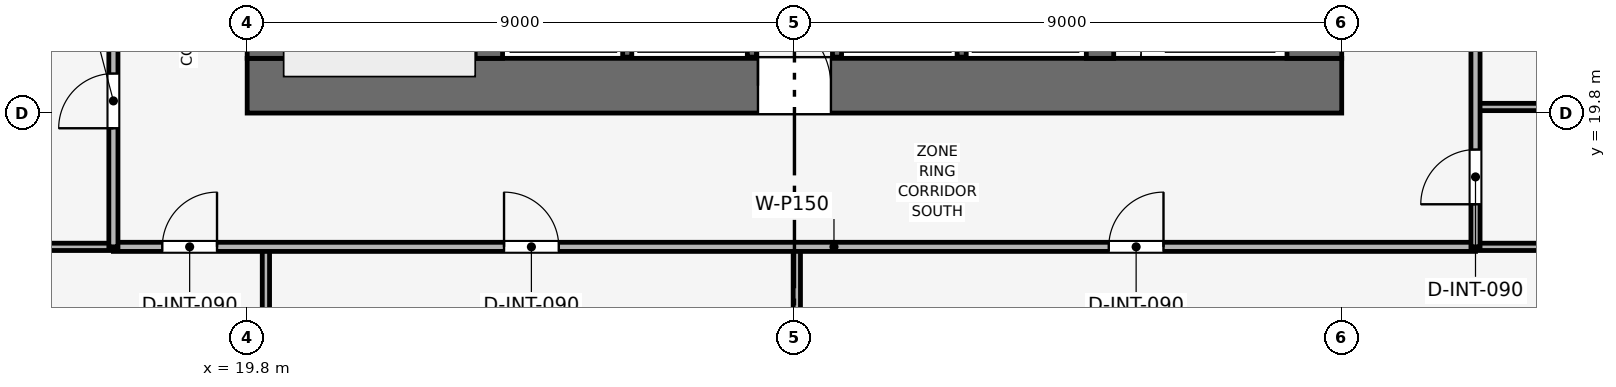
"""IFC4 building model, lengths in metres.
Left out: names, types, materials, properties, quantities, classifications, styles, units other than length and angle.
Written with IfcOpenShell. Run it as: python <this file> out.ifc"""

import sys

from ifc_helpers import new_model, si_unit, direction, frame, frame_2d, origin, place, context, subcontext, project, spatial, rectangle, extrude, element, fill, save


model = new_model("IFC4")
c1 = context("Model", 3, precision=1e-05, world=origin(), true_north=direction((0.0, 1.0)))
c2 = subcontext(c1, "Body", "Model", "MODEL_VIEW")
j1 = project(units=[si_unit("LENGTHUNIT", "METRE"), si_unit("PLANEANGLEUNIT", "RADIAN")], contexts=[c1])
p1 = place(None, origin())
s1 = spatial("IfcSite", under=j1, at=p1, CompositionType="ELEMENT")
p2 = place(p1, origin())
s2 = spatial("IfcBuilding", under=s1, at=p2, CompositionType="ELEMENT")
p3 = place(p2, frame((0.0, 0.0, 121.2)))
s3 = spatial("IfcBuildingStorey", under=s2, at=p3, CompositionType="ELEMENT", Elevation=121.2)
p4 = place(p3, frame((19.8, 20.25, 0.0), z_axis=(0.0, 0.0, 1.0), x_axis=(1.0, 0.0, 0.0)))
e1 = element("IfcWall", 1, at=p4, inside=s3, PredefinedType="SHEAR", context=c2, shape_type="SweptSolid", body=[
    extrude(rectangle(XDim=18.0, YDim=0.9, at=frame_2d((9.0, 0.0))), origin(), (0.0, 0.0, 1.0), 3.9),
])
p5 = place(p4, frame((8.4, 0.0, 0.0)))
e2 = element("IfcOpeningElement", 2, at=p5, cuts=e1, PredefinedType="OPENING", context=c2, shape_type="SweptSolid", body=[
    extrude(rectangle(XDim=1.2, YDim=2.2, at=frame_2d((0.6, 1.1))), frame((0.0, 0.46, 0.0), z_axis=(0.0, -1.0, 0.0), x_axis=(1.0, 0.0, 0.0)), (0.0, 0.0, 1.0), 0.92),
])
p6 = place(p3, frame((20.25, 20.7, 0.0), z_axis=(0.0, 0.0, 1.0), x_axis=(0.0, 1.0, 0.0)))
e3 = element("IfcWall", 3, at=p6, inside=s3, PredefinedType="SHEAR", context=c2, shape_type="SweptSolid", body=[
    extrude(rectangle(XDim=16.2, YDim=0.9, at=frame_2d((8.1, 0.0))), origin(), (0.0, 0.0, 1.0), 3.9),
])
p7 = place(p6, frame((10.1, 0.0, 0.0)))
e4 = element("IfcOpeningElement", 4, at=p7, cuts=e3, PredefinedType="OPENING", context=c2, shape_type="SweptSolid", body=[
    extrude(rectangle(XDim=1.1, YDim=2.15, at=frame_2d((0.55, 1.075))), frame((0.0, 0.46, 0.0), z_axis=(0.0, -1.0, 0.0), x_axis=(1.0, 0.0, 0.0)), (0.0, 0.0, 1.0), 0.92),
])
p8 = place(p3, frame((37.35, 20.7, 0.0), z_axis=(0.0, 0.0, 1.0), x_axis=(0.0, 1.0, 0.0)))
e5 = element("IfcWall", 5, at=p8, inside=s3, PredefinedType="SHEAR", context=c2, shape_type="SweptSolid", body=[
    extrude(rectangle(XDim=16.2, YDim=0.9, at=frame_2d((8.1, 0.0))), origin(), (0.0, 0.0, 1.0), 3.9),
])
p9 = place(p8, frame((4.6, 0.0, 0.0)))
e6 = element("IfcOpeningElement", 6, at=p9, cuts=e5, PredefinedType="OPENING", context=c2, shape_type="SweptSolid", body=[
    extrude(rectangle(XDim=1.1, YDim=2.15, at=frame_2d((0.55, 1.075))), frame((0.0, 0.46, 0.0), z_axis=(0.0, -1.0, 0.0), x_axis=(1.0, 0.0, 0.0)), (0.0, 0.0, 1.0), 0.92),
])
for number, where, z_axis, x_axis in (
    (7, (23.775, 20.7, 0.0), (0.0, 0.0, 1.0), (0.0, 1.0, 0.0)),
    (8, (33.825, 20.7, 0.0), (0.0, 0.0, 1.0), (0.0, 1.0, 0.0)),
):
    element("IfcWall", number, at=place(p3, frame(where, z_axis=z_axis, x_axis=x_axis)), inside=s3, PredefinedType="SHEAR", context=c2, shape_type="SweptSolid", body=[
        extrude(rectangle(XDim=16.2, YDim=0.45, at=frame_2d((8.1, 0.0))), origin(), (0.0, 0.0, 1.0), 3.9),
    ])
for number, where, z_axis, x_axis in (
    (9, (26.05, 20.72, 0.0), (0.0, 0.0, 1.0), (0.0, 1.0, 0.0)),
    (10, (28.1, 20.72, 0.0), (0.0, 0.0, 1.0), (0.0, 1.0, 0.0)),
    (11, (29.5, 20.72, 0.0), (0.0, 0.0, 1.0), (0.0, 1.0, 0.0)),
    (12, (31.55, 20.72, 0.0), (0.0, 0.0, 1.0), (0.0, 1.0, 0.0)),
):
    element("IfcWall", number, at=place(p3, frame(where, z_axis=z_axis, x_axis=x_axis)), inside=s3, PredefinedType="SHEAR", context=c2, shape_type="SweptSolid", body=[
        extrude(rectangle(XDim=2.26, YDim=0.15, at=frame_2d((1.13, 0.0))), origin(), (0.0, 0.0, 1.0), 3.65),
    ])
p10 = place(p3, frame((20.108, 2.83, 0.0), z_axis=(0.0, 0.0, 1.0), x_axis=(0.0, 1.0, 0.0)))
e13 = element("IfcWall", 13, at=p10, inside=s3, PredefinedType="PARTITIONING", context=c2, shape_type="SweptSolid", body=[
    extrude(rectangle(XDim=14.77, YDim=0.12, at=frame_2d((7.385, 0.0))), origin(), (0.0, 0.0, 1.0), 3.035),
])
p11 = place(p3, frame((28.839, 2.83, 0.0), z_axis=(0.0, 0.0, 1.0), x_axis=(0.0, 1.0, 0.0)))
e14 = element("IfcWall", 14, at=p11, inside=s3, PredefinedType="PARTITIONING", context=c2, shape_type="SweptSolid", body=[
    extrude(rectangle(XDim=14.77, YDim=0.12, at=frame_2d((7.385, 0.0))), origin(), (0.0, 0.0, 1.0), 3.135),
])
for number, where, z_axis, x_axis in (
    (15, (2.83, 17.6, 0.0), (0.0, 0.0, 1.0), (1.0, 0.0, 0.0)),
    (16, (40.0, 17.6, 0.0), (0.0, 0.0, 1.0), (1.0, 0.0, 0.0)),
    (17, (40.0, 19.9, 0.0), (0.0, 0.0, 1.0), (1.0, 0.0, 0.0)),
):
    element("IfcWall", number, at=place(p3, frame(where, z_axis=z_axis, x_axis=x_axis)), inside=s3, PredefinedType="PARTITIONING", context=c2, shape_type="SweptSolid", body=[
        extrude(rectangle(XDim=14.77, YDim=0.12, at=frame_2d((7.385, 0.0))), origin(), (0.0, 0.0, 1.0), 3.035),
    ])
p12 = place(p3, frame((17.6, 17.6, 0.0), z_axis=(0.0, 0.0, 1.0), x_axis=(1.0, 0.0, 0.0)))
e18 = element("IfcWall", 18, at=p12, inside=s3, PredefinedType="PARTITIONING", context=c2, shape_type="SweptSolid", body=[
    extrude(rectangle(XDim=22.4, YDim=0.15, at=frame_2d((11.2, 0.0))), origin(), (0.0, 0.0, 1.0), 3.185),
])
p13 = place(p12, frame((0.804, 0.0, 0.0)))
e19 = element("IfcOpeningElement", 19, at=p13, cuts=e18, PredefinedType="OPENING", context=c2, shape_type="SweptSolid", body=[
    extrude(rectangle(XDim=0.9, YDim=2.1, at=frame_2d((0.45, 1.05))), frame((0.0, 0.085, 0.0), z_axis=(0.0, -1.0, 0.0), x_axis=(1.0, 0.0, 0.0)), (0.0, 0.0, 1.0), 0.17),
])
p14 = place(p12, frame((6.424, 0.0, 0.0)))
e20 = element("IfcOpeningElement", 20, at=p14, cuts=e18, PredefinedType="OPENING", context=c2, shape_type="SweptSolid", body=[
    extrude(rectangle(XDim=0.9, YDim=2.1, at=frame_2d((0.45, 1.05))), frame((0.0, 0.085, 0.0), z_axis=(0.0, -1.0, 0.0), x_axis=(1.0, 0.0, 0.0)), (0.0, 0.0, 1.0), 0.17),
])
p15 = place(p12, frame((16.369, 0.0, 0.0)))
e21 = element("IfcOpeningElement", 21, at=p15, cuts=e18, PredefinedType="OPENING", context=c2, shape_type="SweptSolid", body=[
    extrude(rectangle(XDim=0.9, YDim=2.1, at=frame_2d((0.45, 1.05))), frame((0.0, 0.085, 0.0), z_axis=(0.0, -1.0, 0.0), x_axis=(1.0, 0.0, 0.0)), (0.0, 0.0, 1.0), 0.17),
])
p16 = place(p3, frame((17.6, 17.6, 0.0), z_axis=(0.0, 0.0, 1.0), x_axis=(0.0, 1.0, 0.0)))
e22 = element("IfcWall", 22, at=p16, inside=s3, PredefinedType="PARTITIONING", context=c2, shape_type="SweptSolid", body=[
    extrude(rectangle(XDim=22.4, YDim=0.15, at=frame_2d((11.2, 0.0))), origin(), (0.0, 0.0, 1.0), 3.185),
])
p17 = place(p16, frame((1.95, 0.0, 0.0)))
e23 = element("IfcOpeningElement", 23, at=p17, cuts=e22, PredefinedType="OPENING", context=c2, shape_type="SweptSolid", body=[
    extrude(rectangle(XDim=0.9, YDim=2.1, at=frame_2d((0.45, 1.05))), frame((0.0, 0.085, 0.0), z_axis=(0.0, -1.0, 0.0), x_axis=(1.0, 0.0, 0.0)), (0.0, 0.0, 1.0), 0.17),
])
p18 = place(p16, frame((5.75, 0.0, 0.0)))
e24 = element("IfcOpeningElement", 24, at=p18, cuts=e22, PredefinedType="OPENING", context=c2, shape_type="SweptSolid", body=[
    extrude(rectangle(XDim=0.9, YDim=2.1, at=frame_2d((0.45, 1.05))), frame((0.0, 0.085, 0.0), z_axis=(0.0, -1.0, 0.0), x_axis=(1.0, 0.0, 0.0)), (0.0, 0.0, 1.0), 0.17),
])
p19 = place(p16, frame((8.65, 0.0, 0.0)))
e25 = element("IfcOpeningElement", 25, at=p19, cuts=e22, PredefinedType="OPENING", context=c2, shape_type="SweptSolid", body=[
    extrude(rectangle(XDim=0.9, YDim=2.1, at=frame_2d((0.45, 1.05))), frame((0.0, 0.085, 0.0), z_axis=(0.0, -1.0, 0.0), x_axis=(1.0, 0.0, 0.0)), (0.0, 0.0, 1.0), 0.17),
])
p20 = place(p16, frame((11.4, 0.0, 0.0)))
e26 = element("IfcOpeningElement", 26, at=p20, cuts=e22, PredefinedType="OPENING", context=c2, shape_type="SweptSolid", body=[
    extrude(rectangle(XDim=0.95, YDim=2.1, at=frame_2d((0.475, 1.05))), frame((0.0, 0.085, 0.0), z_axis=(0.0, -1.0, 0.0), x_axis=(1.0, 0.0, 0.0)), (0.0, 0.0, 1.0), 0.17),
])
p21 = place(p16, frame((17.35, 0.0, 0.0)))
e27 = element("IfcOpeningElement", 27, at=p21, cuts=e22, PredefinedType="OPENING", context=c2, shape_type="SweptSolid", body=[
    extrude(rectangle(XDim=0.9, YDim=2.1, at=frame_2d((0.45, 1.05))), frame((0.0, 0.085, 0.0), z_axis=(0.0, -1.0, 0.0), x_axis=(1.0, 0.0, 0.0)), (0.0, 0.0, 1.0), 0.17),
])
p22 = place(p3, frame((40.0, 17.6, 0.0), z_axis=(0.0, 0.0, 1.0), x_axis=(0.0, 1.0, 0.0)))
e28 = element("IfcWall", 28, at=p22, inside=s3, PredefinedType="PARTITIONING", context=c2, shape_type="SweptSolid", body=[
    extrude(rectangle(XDim=22.4, YDim=0.15, at=frame_2d((11.2, 0.0))), origin(), (0.0, 0.0, 1.0), 3.185),
])
p23 = place(p22, frame((0.7, 0.0, 0.0)))
e29 = element("IfcOpeningElement", 29, at=p23, cuts=e28, PredefinedType="OPENING", context=c2, shape_type="SweptSolid", body=[
    extrude(rectangle(XDim=0.9, YDim=2.1, at=frame_2d((0.45, 1.05))), frame((0.0, 0.085, 0.0), z_axis=(0.0, -1.0, 0.0), x_axis=(1.0, 0.0, 0.0)), (0.0, 0.0, 1.0), 0.17),
])
p24 = place(p22, frame((6.378, 0.0, 0.0)))
e30 = element("IfcOpeningElement", 30, at=p24, cuts=e28, PredefinedType="OPENING", context=c2, shape_type="SweptSolid", body=[
    extrude(rectangle(XDim=0.9, YDim=2.1, at=frame_2d((0.45, 1.05))), frame((0.0, 0.085, 0.0), z_axis=(0.0, -1.0, 0.0), x_axis=(1.0, 0.0, 0.0)), (0.0, 0.0, 1.0), 0.17),
])
p25 = place(p22, frame((16.428, 0.0, 0.0)))
e31 = element("IfcOpeningElement", 31, at=p25, cuts=e28, PredefinedType="OPENING", context=c2, shape_type="SweptSolid", body=[
    extrude(rectangle(XDim=0.9, YDim=2.1, at=frame_2d((0.45, 1.05))), frame((0.0, 0.085, 0.0), z_axis=(0.0, -1.0, 0.0), x_axis=(1.0, 0.0, 0.0)), (0.0, 0.0, 1.0), 0.17),
])
p26 = place(p13, origin())
e32 = element("IfcDoor", 32, at=p26, inside=s3, OperationType="SINGLE_SWING_RIGHT", PredefinedType="DOOR", context=c2, shape_type="SweptSolid", body=[
    extrude(rectangle(XDim=0.9, YDim=2.1, at=frame_2d((0.45, 1.05))), frame((0.0, 0.025, 0.0), z_axis=(0.0, -1.0, 0.0), x_axis=(1.0, 0.0, 0.0)), (0.0, 0.0, 1.0), 0.05),
])
fill(e19, e32)
p27 = place(p14, origin())
e33 = element("IfcDoor", 33, at=p27, inside=s3, OperationType="SINGLE_SWING_LEFT", PredefinedType="DOOR", context=c2, shape_type="SweptSolid", body=[
    extrude(rectangle(XDim=0.9, YDim=2.1, at=frame_2d((0.45, 1.05))), frame((0.0, 0.025, 0.0), z_axis=(0.0, -1.0, 0.0), x_axis=(1.0, 0.0, 0.0)), (0.0, 0.0, 1.0), 0.05),
])
fill(e20, e33)
p28 = place(p15, origin())
e34 = element("IfcDoor", 34, at=p28, inside=s3, OperationType="SINGLE_SWING_RIGHT", PredefinedType="DOOR", context=c2, shape_type="SweptSolid", body=[
    extrude(rectangle(XDim=0.9, YDim=2.1, at=frame_2d((0.45, 1.05))), frame((0.0, 0.025, 0.0), z_axis=(0.0, -1.0, 0.0), x_axis=(1.0, 0.0, 0.0)), (0.0, 0.0, 1.0), 0.05),
])
fill(e21, e34)
p29 = place(p17, origin())
e35 = element("IfcDoor", 35, at=p29, inside=s3, OperationType="SINGLE_SWING_LEFT", PredefinedType="DOOR", context=c2, shape_type="SweptSolid", body=[
    extrude(rectangle(XDim=0.9, YDim=2.1, at=frame_2d((0.45, 1.05))), frame((0.0, 0.025, 0.0), z_axis=(0.0, -1.0, 0.0), x_axis=(1.0, 0.0, 0.0)), (0.0, 0.0, 1.0), 0.05),
])
fill(e23, e35)
p30 = place(p23, origin())
e36 = element("IfcDoor", 36, at=p30, inside=s3, OperationType="SINGLE_SWING_LEFT", PredefinedType="DOOR", context=c2, shape_type="SweptSolid", body=[
    extrude(rectangle(XDim=0.9, YDim=2.1, at=frame_2d((0.45, 1.05))), frame((0.0, 0.025, 0.0), z_axis=(0.0, -1.0, 0.0), x_axis=(1.0, 0.0, 0.0)), (0.0, 0.0, 1.0), 0.05),
])
fill(e29, e36)
p31 = place(p5, origin())
e37 = element("IfcDoor", 37, at=p31, inside=s3, OperationType="SINGLE_SWING_LEFT", PredefinedType="DOOR", context=c2, shape_type="SweptSolid", body=[
    extrude(rectangle(XDim=1.2, YDim=2.2, at=frame_2d((0.6, 1.1))), frame((0.0, 0.025, 0.0), z_axis=(0.0, -1.0, 0.0), x_axis=(1.0, 0.0, 0.0)), (0.0, 0.0, 1.0), 0.05),
])
fill(e2, e37)
save(model, sys.argv[1])
